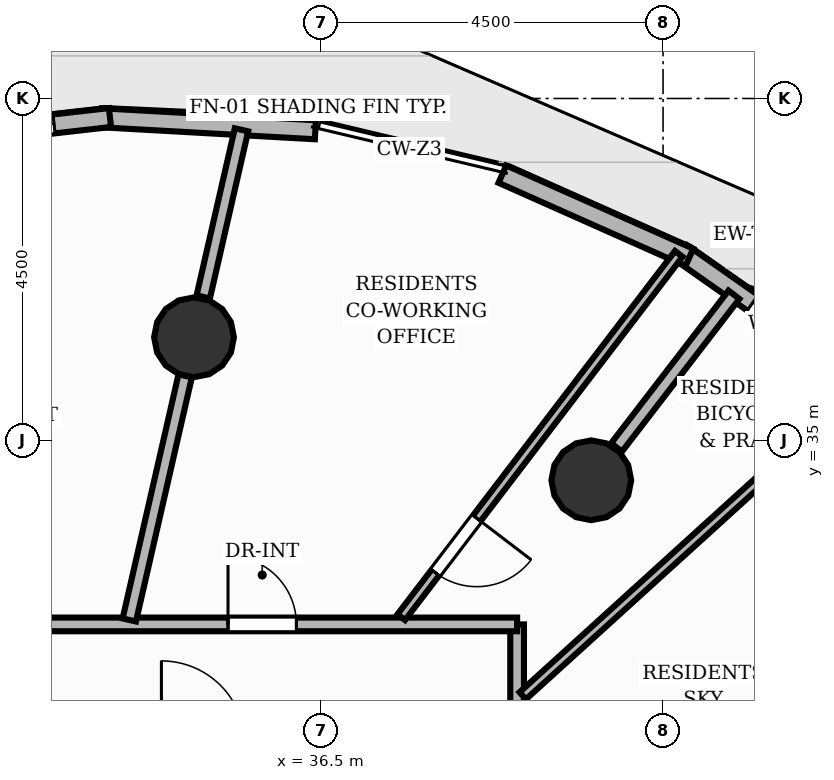
"""IFC4 building model, lengths in metres.
Left out: names, types, materials, properties, quantities, classifications, styles, units other than length and angle.
Written with IfcOpenShell. Run it as: python <this file> out.ifc"""

import sys

from ifc_helpers import new_model, si_unit, direction, frame, frame_2d, origin, origin_2d, place, context, subcontext, project, spatial, rectangle, circle, extrude, element, fill, save


model = new_model("IFC4")
c1 = context("Model", 3, precision=1e-05, world=origin(), true_north=direction((0.0, 1.0)))
c2 = subcontext(c1, "Body", "Model", "MODEL_VIEW")
j1 = project(units=[si_unit("LENGTHUNIT", "METRE"), si_unit("PLANEANGLEUNIT", "RADIAN")], contexts=[c1])
p1 = place(None, origin())
s1 = spatial("IfcSite", under=j1, at=p1, CompositionType="ELEMENT")
p2 = place(p1, origin())
s2 = spatial("IfcBuilding", under=s1, at=p2, CompositionType="ELEMENT")
p3 = place(p2, frame((0.0, 0.0, 155.36)))
s3 = spatial("IfcBuildingStorey", under=s2, at=p3, CompositionType="ELEMENT", Elevation=155.36)
for number, where, z_axis, x_axis in (
    (1, (40.056, 34.477, 0.0), (0.0, 0.0, 1.0), (1.0, 0.0, 0.0)),
    (2, (34.829, 36.358, 0.0), (0.0, 0.0, 1.0), (1.0, 0.0, 0.0)),
):
    element("IfcColumn", number, at=place(p3, frame(where, z_axis=z_axis, x_axis=x_axis)), inside=s3, PredefinedType="COLUMN", context=c2, shape_type="SweptSolid", body=[
        extrude(circle(Radius=0.525, at=origin_2d()), origin(), (0.0, 0.0, 1.0), 3.2),
    ])
p4 = place(p3, frame((41.247, 37.466, 0.0), z_axis=(0.0, 0.0, 1.0), x_axis=(0.818434239786, -0.574600204617, 0.0)))
e3 = element("IfcWall", 3, at=p4, inside=s3, PredefinedType="SOLIDWALL", context=c2, shape_type="SweptSolid", body=[
    extrude(rectangle(XDim=2.648, YDim=0.25, at=frame_2d((1.324, 0.0))), origin(), (0.0, 0.0, 1.0), 2.8),
])
p5 = place(p4, frame((1.138, 0.0, 0.85)))
e4 = element("IfcOpeningElement", 4, at=p5, cuts=e3, PredefinedType="OPENING", context=c2, shape_type="SweptSolid", body=[
    extrude(rectangle(XDim=0.95, YDim=1.29, at=frame_2d((0.475, 0.645))), frame((0.0, 0.135, 0.0), z_axis=(0.0, -1.0, 0.0), x_axis=(1.0, 0.0, 0.0)), (0.0, 0.0, 1.0), 0.27),
])
p6 = place(p3, frame((38.886, 38.505, 0.0), z_axis=(0.0, 0.0, 1.0), x_axis=(0.913598321014, -0.406617889228, 0.0)))
e5 = element("IfcWall", 5, at=p6, inside=s3, PredefinedType="SOLIDWALL", context=c2, shape_type="SweptSolid", body=[
    extrude(rectangle(XDim=2.693, YDim=0.25, at=frame_2d((1.346, 0.0))), origin(), (0.0, 0.0, 1.0), 2.8),
])
p7 = place(p3, frame((33.613, 39.246, 0.0), z_axis=(0.0, 0.0, 1.0), x_axis=(0.998436800423, -0.055892356906, 0.0)))
e6 = element("IfcWall", 6, at=p7, inside=s3, PredefinedType="SOLIDWALL", context=c2, shape_type="SweptSolid", body=[
    extrude(rectangle(XDim=2.817, YDim=0.25, at=frame_2d((1.409, 0.0))), origin(), (0.0, 0.0, 1.0), 2.8),
])
p8 = place(p3, frame((30.86, 38.924, 0.0), z_axis=(0.0, 0.0, 1.0), x_axis=(0.993631150985, 0.112681568111, 0.0)))
e7 = element("IfcWall", 7, at=p8, inside=s3, PredefinedType="SOLIDWALL", context=c2, shape_type="SweptSolid", body=[
    extrude(rectangle(XDim=2.882, YDim=0.25, at=frame_2d((1.441, 0.0))), origin(), (0.0, 0.0, 1.0), 2.8),
])
p9 = place(p8, frame((0.741, 0.0, 0.85)))
e8 = element("IfcOpeningElement", 8, at=p9, cuts=e7, PredefinedType="OPENING", context=c2, shape_type="SweptSolid", body=[
    extrude(rectangle(XDim=1.4, YDim=1.55, at=frame_2d((0.7, 0.775))), frame((0.0, 0.135, 0.0), z_axis=(0.0, -1.0, 0.0), x_axis=(1.0, 0.0, 0.0)), (0.0, 0.0, 1.0), 0.27),
])
p10 = place(p3, frame((40.388, 34.908, 0.0), z_axis=(0.0, 0.0, 1.0), x_axis=(0.609529171404, 0.79276364019, 0.0)))
e9 = element("IfcWall", 9, at=p10, inside=s3, PredefinedType="PARTITIONING", context=c2, shape_type="SweptSolid", body=[
    extrude(rectangle(XDim=2.534, YDim=0.18, at=frame_2d((1.267, 0.0))), origin(), (0.0, 0.0, 1.0), 2.176),
])
p11 = place(p3, frame((34.95, 36.889, 0.0), z_axis=(0.0, 0.0, 1.0), x_axis=(0.223104026265, 0.974794641688, 0.0)))
e10 = element("IfcWall", 10, at=p11, inside=s3, PredefinedType="PARTITIONING", context=c2, shape_type="SweptSolid", body=[
    extrude(rectangle(XDim=2.255, YDim=0.18, at=frame_2d((1.128, 0.0))), origin(), (0.0, 0.0, 1.0), 2.176),
])
p12 = place(p3, frame((39.08, 32.58, 0.0), z_axis=(0.0, 0.0, 1.0), x_axis=(0.0, -1.0, 0.0)))
e11 = element("IfcWall", 11, at=p12, inside=s3, PredefinedType="PARTITIONING", context=c2, shape_type="SweptSolid", body=[
    extrude(rectangle(XDim=17.16, YDim=0.18, at=frame_2d((8.58, 0.0))), origin(), (0.0, 0.0, 1.0), 2.795),
])
p13 = place(p12, frame((8.667, 0.0, 0.0)))
e12 = element("IfcOpeningElement", 12, at=p13, cuts=e11, PredefinedType="OPENING", context=c2, shape_type="SweptSolid", body=[
    extrude(rectangle(XDim=1.05, YDim=2.15, at=frame_2d((0.525, 1.075))), frame((0.0, 0.1, 0.0), z_axis=(0.0, -1.0, 0.0), x_axis=(1.0, 0.0, 0.0)), (0.0, 0.0, 1.0), 0.2),
])
p14 = place(p12, frame((2.284, 0.0, 0.0)))
e13 = element("IfcOpeningElement", 13, at=p14, cuts=e11, PredefinedType="OPENING", context=c2, shape_type="SweptSolid", body=[
    extrude(rectangle(XDim=0.9, YDim=2.1, at=frame_2d((0.45, 1.05))), frame((0.0, 0.1, 0.0), z_axis=(0.0, -1.0, 0.0), x_axis=(1.0, 0.0, 0.0)), (0.0, 0.0, 1.0), 0.2),
])
p15 = place(p3, frame((29.544, 32.58, 0.0), z_axis=(0.0, 0.0, 1.0), x_axis=(1.0, 0.0, 0.0)))
e14 = element("IfcWall", 14, at=p15, inside=s3, PredefinedType="PARTITIONING", context=c2, shape_type="SweptSolid", body=[
    extrude(rectangle(XDim=9.536, YDim=0.18, at=frame_2d((4.768, 0.0))), origin(), (0.0, 0.0, 1.0), 2.795),
])
p16 = place(p15, frame((5.733, 0.0, 0.0)))
e15 = element("IfcOpeningElement", 15, at=p16, cuts=e14, PredefinedType="OPENING", context=c2, shape_type="SweptSolid", body=[
    extrude(rectangle(XDim=0.9, YDim=2.1, at=frame_2d((0.45, 1.05))), frame((0.0, 0.1, 0.0), z_axis=(0.0, -1.0, 0.0), x_axis=(1.0, 0.0, 0.0)), (0.0, 0.0, 1.0), 0.2),
])
p17 = place(p3, frame((41.207, 37.455, 0.0), z_axis=(0.0, 0.0, 1.0), x_axis=(-0.606958821331, -0.794733281805, 0.0)))
e16 = element("IfcWall", 16, at=p17, inside=s3, PredefinedType="PARTITIONING", context=c2, shape_type="SweptSolid", body=[
    extrude(rectangle(XDim=6.015, YDim=0.125, at=frame_2d((3.007, 0.0))), origin(), (0.0, 0.0, 1.0), 2.795),
])
p18 = place(p17, frame((4.377, 0.0, 0.0)))
e17 = element("IfcOpeningElement", 17, at=p18, cuts=e16, PredefinedType="OPENING", context=c2, shape_type="SweptSolid", body=[
    extrude(rectangle(XDim=0.9, YDim=2.1, at=frame_2d((0.45, 1.05))), frame((0.0, 0.073, 0.0), z_axis=(0.0, -1.0, 0.0), x_axis=(1.0, 0.0, 0.0)), (0.0, 0.0, 1.0), 0.145),
])
p19 = place(p3, frame((33.977, 32.638, 0.0), z_axis=(0.0, 0.0, 1.0), x_axis=(0.22319287001, 0.974774303506, 0.0)))
e18 = element("IfcWall", 18, at=p19, inside=s3, PredefinedType="PARTITIONING", context=c2, shape_type="SweptSolid", body=[
    extrude(rectangle(XDim=3.296, YDim=0.18, at=frame_2d((1.648, 0.0))), origin(), (0.0, 0.0, 1.0), 2.176),
])
p20 = place(p3, frame((39.154, 31.641, 0.0), z_axis=(0.0, 0.0, 1.0), x_axis=(0.740463996849, 0.672096026896, 0.0)))
e19 = element("IfcWall", 19, at=p20, inside=s3, PredefinedType="PARTITIONING", context=c2, shape_type="SweptSolid", body=[
    extrude(rectangle(XDim=6.028, YDim=0.125, at=frame_2d((3.014, 0.0))), origin(), (0.0, 0.0, 1.0), 2.795),
])
p21 = place(p5, origin())
e20 = element("IfcWindow", 20, at=p21, inside=s3, PartitioningType="SINGLE_PANEL", PredefinedType="WINDOW", context=c2, shape_type="SweptSolid", body=[
    extrude(rectangle(XDim=0.95, YDim=1.29, at=frame_2d((0.475, 0.645))), frame((0.0, 0.03, 0.0), z_axis=(0.0, -1.0, 0.0), x_axis=(1.0, 0.0, 0.0)), (0.0, 0.0, 1.0), 0.06),
])
fill(e4, e20)
p22 = place(p9, origin())
e21 = element("IfcWindow", 21, at=p22, inside=s3, PartitioningType="SINGLE_PANEL", PredefinedType="WINDOW", context=c2, shape_type="SweptSolid", body=[
    extrude(rectangle(XDim=1.4, YDim=1.55, at=frame_2d((0.7, 0.775))), frame((0.0, 0.03, 0.0), z_axis=(0.0, -1.0, 0.0), x_axis=(1.0, 0.0, 0.0)), (0.0, 0.0, 1.0), 0.06),
])
fill(e8, e21)
p23 = place(p16, origin())
e22 = element("IfcDoor", 22, at=p23, inside=s3, OperationType="SINGLE_SWING_LEFT", PredefinedType="DOOR", context=c2, shape_type="SweptSolid", body=[
    extrude(rectangle(XDim=0.9, YDim=2.1, at=frame_2d((0.45, 1.05))), frame((0.0, 0.025, 0.0), z_axis=(0.0, -1.0, 0.0), x_axis=(1.0, 0.0, 0.0)), (0.0, 0.0, 1.0), 0.05),
])
fill(e15, e22)
p24 = place(p18, origin())
e23 = element("IfcDoor", 23, at=p24, inside=s3, OperationType="SINGLE_SWING_LEFT", PredefinedType="DOOR", context=c2, shape_type="SweptSolid", body=[
    extrude(rectangle(XDim=0.9, YDim=2.1, at=frame_2d((0.45, 1.05))), frame((0.0, 0.025, 0.0), z_axis=(0.0, -1.0, 0.0), x_axis=(1.0, 0.0, 0.0)), (0.0, 0.0, 1.0), 0.05),
])
fill(e17, e23)
save(model, sys.argv[1])
